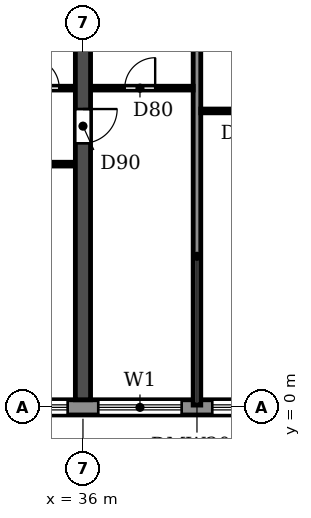
"""IFC4 building model, lengths in metres.
Left out: names, types, materials, properties, quantities, classifications, styles, units other than length and angle.
Written with IfcOpenShell. Run it as: python <this file> out.ifc"""

import sys

from ifc_helpers import new_model, si_unit, direction, frame, frame_2d, origin, place, context, subcontext, project, spatial, rectangle, extrude, element, fill, save


model = new_model("IFC4")
c1 = context("Model", 3, precision=1e-05, world=origin(), true_north=direction((0.0, 1.0)))
c2 = subcontext(c1, "Body", "Model", "MODEL_VIEW")
j1 = project(units=[si_unit("LENGTHUNIT", "METRE"), si_unit("PLANEANGLEUNIT", "RADIAN")], contexts=[c1])
p1 = place(None, origin())
s1 = spatial("IfcSite", under=j1, at=p1, CompositionType="ELEMENT")
p2 = place(p1, origin())
s2 = spatial("IfcBuilding", under=s1, at=p2, CompositionType="ELEMENT")
p3 = place(p2, frame((0.0, 0.0, 33.3)))
s3 = spatial("IfcBuildingStorey", under=s2, at=p3, CompositionType="ELEMENT", Elevation=33.3)
p4 = place(p3, frame((36.0, 0.2, 0.0), z_axis=(0.0, 0.0, 1.0), x_axis=(0.0, 1.0, 0.0)))
e1 = element("IfcWall", 1, at=p4, inside=s3, PredefinedType="SHEAR", context=c2, shape_type="SweptSolid", body=[
    extrude(rectangle(XDim=11.65, YDim=0.4, at=frame_2d((5.825, 0.0))), origin(), (0.0, 0.0, 1.0), 3.05),
])
p5 = place(p4, frame((6.75, 0.0, 0.0)))
e2 = element("IfcOpeningElement", 2, at=p5, cuts=e1, PredefinedType="OPENING", context=c2, shape_type="SweptSolid", body=[
    extrude(rectangle(XDim=0.9, YDim=2.1, at=frame_2d((0.45, 1.05))), frame((0.0, 0.21, 0.0), z_axis=(0.0, -1.0, 0.0), x_axis=(1.0, 0.0, 0.0)), (0.0, 0.0, 1.0), 0.42),
])
p6 = place(p3, frame((4.683, 0.0, 0.0), z_axis=(0.0, 0.0, 1.0), x_axis=(1.0, 0.0, 0.0)))
e3 = element("IfcWall", 3, at=p6, inside=s3, PredefinedType="STANDARD", context=c2, shape_type="SweptSolid", body=[
    extrude(rectangle(XDim=92.634, YDim=0.4, at=frame_2d((46.317, 0.0))), origin(), (0.0, 0.0, 1.0), 3.05),
])
p7 = place(p6, frame((1.717, 0.0, 0.9)))
e4 = element("IfcOpeningElement", 4, at=p7, cuts=e3, PredefinedType="OPENING", context=c2, shape_type="SweptSolid", body=[
    extrude(rectangle(XDim=2.2, YDim=1.5, at=frame_2d((1.1, 0.75))), frame((0.0, 0.21, 0.0), z_axis=(0.0, -1.0, 0.0), x_axis=(1.0, 0.0, 0.0)), (0.0, 0.0, 1.0), 0.42),
])
p8 = place(p6, frame((4.717, 0.0, 0.9)))
e5 = element("IfcOpeningElement", 5, at=p8, cuts=e3, PredefinedType="OPENING", context=c2, shape_type="SweptSolid", body=[
    extrude(rectangle(XDim=2.2, YDim=1.5, at=frame_2d((1.1, 0.75))), frame((0.0, 0.21, 0.0), z_axis=(0.0, -1.0, 0.0), x_axis=(1.0, 0.0, 0.0)), (0.0, 0.0, 1.0), 0.42),
])
p9 = place(p6, frame((7.917, 0.0, 0.0)))
e6 = element("IfcOpeningElement", 6, at=p9, cuts=e3, PredefinedType="OPENING", context=c2, shape_type="SweptSolid", body=[
    extrude(rectangle(XDim=1.8, YDim=2.4, at=frame_2d((0.9, 1.2))), frame((0.0, 0.21, 0.0), z_axis=(0.0, -1.0, 0.0), x_axis=(1.0, 0.0, 0.0)), (0.0, 0.0, 1.0), 0.42),
])
p10 = place(p6, frame((10.717, 0.0, 0.9)))
e7 = element("IfcOpeningElement", 7, at=p10, cuts=e3, PredefinedType="OPENING", context=c2, shape_type="SweptSolid", body=[
    extrude(rectangle(XDim=2.2, YDim=1.5, at=frame_2d((1.1, 0.75))), frame((0.0, 0.21, 0.0), z_axis=(0.0, -1.0, 0.0), x_axis=(1.0, 0.0, 0.0)), (0.0, 0.0, 1.0), 0.42),
])
p11 = place(p6, frame((13.717, 0.0, 0.9)))
e8 = element("IfcOpeningElement", 8, at=p11, cuts=e3, PredefinedType="OPENING", context=c2, shape_type="SweptSolid", body=[
    extrude(rectangle(XDim=2.2, YDim=1.5, at=frame_2d((1.1, 0.75))), frame((0.0, 0.21, 0.0), z_axis=(0.0, -1.0, 0.0), x_axis=(1.0, 0.0, 0.0)), (0.0, 0.0, 1.0), 0.42),
])
p12 = place(p6, frame((16.717, 0.0, 0.9)))
e9 = element("IfcOpeningElement", 9, at=p12, cuts=e3, PredefinedType="OPENING", context=c2, shape_type="SweptSolid", body=[
    extrude(rectangle(XDim=2.2, YDim=1.5, at=frame_2d((1.1, 0.75))), frame((0.0, 0.21, 0.0), z_axis=(0.0, -1.0, 0.0), x_axis=(1.0, 0.0, 0.0)), (0.0, 0.0, 1.0), 0.42),
])
p13 = place(p6, frame((19.717, 0.0, 0.9)))
e10 = element("IfcOpeningElement", 10, at=p13, cuts=e3, PredefinedType="OPENING", context=c2, shape_type="SweptSolid", body=[
    extrude(rectangle(XDim=2.2, YDim=1.5, at=frame_2d((1.1, 0.75))), frame((0.0, 0.21, 0.0), z_axis=(0.0, -1.0, 0.0), x_axis=(1.0, 0.0, 0.0)), (0.0, 0.0, 1.0), 0.42),
])
p14 = place(p6, frame((22.917, 0.0, 0.0)))
e11 = element("IfcOpeningElement", 11, at=p14, cuts=e3, PredefinedType="OPENING", context=c2, shape_type="SweptSolid", body=[
    extrude(rectangle(XDim=1.8, YDim=2.4, at=frame_2d((0.9, 1.2))), frame((0.0, 0.21, 0.0), z_axis=(0.0, -1.0, 0.0), x_axis=(1.0, 0.0, 0.0)), (0.0, 0.0, 1.0), 0.42),
])
p15 = place(p6, frame((25.717, 0.0, 0.9)))
e12 = element("IfcOpeningElement", 12, at=p15, cuts=e3, PredefinedType="OPENING", context=c2, shape_type="SweptSolid", body=[
    extrude(rectangle(XDim=2.2, YDim=1.5, at=frame_2d((1.1, 0.75))), frame((0.0, 0.21, 0.0), z_axis=(0.0, -1.0, 0.0), x_axis=(1.0, 0.0, 0.0)), (0.0, 0.0, 1.0), 0.42),
])
p16 = place(p6, frame((28.717, 0.0, 0.9)))
e13 = element("IfcOpeningElement", 13, at=p16, cuts=e3, PredefinedType="OPENING", context=c2, shape_type="SweptSolid", body=[
    extrude(rectangle(XDim=2.2, YDim=1.5, at=frame_2d((1.1, 0.75))), frame((0.0, 0.21, 0.0), z_axis=(0.0, -1.0, 0.0), x_axis=(1.0, 0.0, 0.0)), (0.0, 0.0, 1.0), 0.42),
])
p17 = place(p6, frame((31.717, 0.0, 0.9)))
e14 = element("IfcOpeningElement", 14, at=p17, cuts=e3, PredefinedType="OPENING", context=c2, shape_type="SweptSolid", body=[
    extrude(rectangle(XDim=2.2, YDim=1.5, at=frame_2d((1.1, 0.75))), frame((0.0, 0.21, 0.0), z_axis=(0.0, -1.0, 0.0), x_axis=(1.0, 0.0, 0.0)), (0.0, 0.0, 1.0), 0.42),
])
p18 = place(p6, frame((34.717, 0.0, 0.9)))
e15 = element("IfcOpeningElement", 15, at=p18, cuts=e3, PredefinedType="OPENING", context=c2, shape_type="SweptSolid", body=[
    extrude(rectangle(XDim=2.2, YDim=1.5, at=frame_2d((1.1, 0.75))), frame((0.0, 0.21, 0.0), z_axis=(0.0, -1.0, 0.0), x_axis=(1.0, 0.0, 0.0)), (0.0, 0.0, 1.0), 0.42),
])
p19 = place(p6, frame((37.717, 0.0, 0.9)))
e16 = element("IfcOpeningElement", 16, at=p19, cuts=e3, PredefinedType="OPENING", context=c2, shape_type="SweptSolid", body=[
    extrude(rectangle(XDim=2.2, YDim=1.5, at=frame_2d((1.1, 0.75))), frame((0.0, 0.21, 0.0), z_axis=(0.0, -1.0, 0.0), x_axis=(1.0, 0.0, 0.0)), (0.0, 0.0, 1.0), 0.42),
])
p20 = place(p6, frame((40.717, 0.0, 0.9)))
e17 = element("IfcOpeningElement", 17, at=p20, cuts=e3, PredefinedType="OPENING", context=c2, shape_type="SweptSolid", body=[
    extrude(rectangle(XDim=2.2, YDim=1.5, at=frame_2d((1.1, 0.75))), frame((0.0, 0.21, 0.0), z_axis=(0.0, -1.0, 0.0), x_axis=(1.0, 0.0, 0.0)), (0.0, 0.0, 1.0), 0.42),
])
p21 = place(p6, frame((43.717, 0.0, 0.9)))
e18 = element("IfcOpeningElement", 18, at=p21, cuts=e3, PredefinedType="OPENING", context=c2, shape_type="SweptSolid", body=[
    extrude(rectangle(XDim=2.2, YDim=1.5, at=frame_2d((1.1, 0.75))), frame((0.0, 0.21, 0.0), z_axis=(0.0, -1.0, 0.0), x_axis=(1.0, 0.0, 0.0)), (0.0, 0.0, 1.0), 0.42),
])
p22 = place(p6, frame((46.917, 0.0, 0.0)))
e19 = element("IfcOpeningElement", 19, at=p22, cuts=e3, PredefinedType="OPENING", context=c2, shape_type="SweptSolid", body=[
    extrude(rectangle(XDim=1.8, YDim=2.4, at=frame_2d((0.9, 1.2))), frame((0.0, 0.21, 0.0), z_axis=(0.0, -1.0, 0.0), x_axis=(1.0, 0.0, 0.0)), (0.0, 0.0, 1.0), 0.42),
])
p23 = place(p6, frame((49.717, 0.0, 0.9)))
e20 = element("IfcOpeningElement", 20, at=p23, cuts=e3, PredefinedType="OPENING", context=c2, shape_type="SweptSolid", body=[
    extrude(rectangle(XDim=2.2, YDim=1.5, at=frame_2d((1.1, 0.75))), frame((0.0, 0.21, 0.0), z_axis=(0.0, -1.0, 0.0), x_axis=(1.0, 0.0, 0.0)), (0.0, 0.0, 1.0), 0.42),
])
p24 = place(p6, frame((52.717, 0.0, 0.9)))
e21 = element("IfcOpeningElement", 21, at=p24, cuts=e3, PredefinedType="OPENING", context=c2, shape_type="SweptSolid", body=[
    extrude(rectangle(XDim=2.2, YDim=1.5, at=frame_2d((1.1, 0.75))), frame((0.0, 0.21, 0.0), z_axis=(0.0, -1.0, 0.0), x_axis=(1.0, 0.0, 0.0)), (0.0, 0.0, 1.0), 0.42),
])
p25 = place(p6, frame((55.717, 0.0, 0.9)))
e22 = element("IfcOpeningElement", 22, at=p25, cuts=e3, PredefinedType="OPENING", context=c2, shape_type="SweptSolid", body=[
    extrude(rectangle(XDim=2.2, YDim=1.5, at=frame_2d((1.1, 0.75))), frame((0.0, 0.21, 0.0), z_axis=(0.0, -1.0, 0.0), x_axis=(1.0, 0.0, 0.0)), (0.0, 0.0, 1.0), 0.42),
])
p26 = place(p6, frame((58.917, 0.0, 0.0)))
e23 = element("IfcOpeningElement", 23, at=p26, cuts=e3, PredefinedType="OPENING", context=c2, shape_type="SweptSolid", body=[
    extrude(rectangle(XDim=1.8, YDim=2.4, at=frame_2d((0.9, 1.2))), frame((0.0, 0.21, 0.0), z_axis=(0.0, -1.0, 0.0), x_axis=(1.0, 0.0, 0.0)), (0.0, 0.0, 1.0), 0.42),
])
p27 = place(p6, frame((61.717, 0.0, 0.9)))
e24 = element("IfcOpeningElement", 24, at=p27, cuts=e3, PredefinedType="OPENING", context=c2, shape_type="SweptSolid", body=[
    extrude(rectangle(XDim=2.2, YDim=1.5, at=frame_2d((1.1, 0.75))), frame((0.0, 0.21, 0.0), z_axis=(0.0, -1.0, 0.0), x_axis=(1.0, 0.0, 0.0)), (0.0, 0.0, 1.0), 0.42),
])
p28 = place(p6, frame((64.717, 0.0, 0.9)))
e25 = element("IfcOpeningElement", 25, at=p28, cuts=e3, PredefinedType="OPENING", context=c2, shape_type="SweptSolid", body=[
    extrude(rectangle(XDim=2.2, YDim=1.5, at=frame_2d((1.1, 0.75))), frame((0.0, 0.21, 0.0), z_axis=(0.0, -1.0, 0.0), x_axis=(1.0, 0.0, 0.0)), (0.0, 0.0, 1.0), 0.42),
])
p29 = place(p6, frame((67.717, 0.0, 0.9)))
e26 = element("IfcOpeningElement", 26, at=p29, cuts=e3, PredefinedType="OPENING", context=c2, shape_type="SweptSolid", body=[
    extrude(rectangle(XDim=2.2, YDim=1.5, at=frame_2d((1.1, 0.75))), frame((0.0, 0.21, 0.0), z_axis=(0.0, -1.0, 0.0), x_axis=(1.0, 0.0, 0.0)), (0.0, 0.0, 1.0), 0.42),
])
p30 = place(p6, frame((70.917, 0.0, 0.0)))
e27 = element("IfcOpeningElement", 27, at=p30, cuts=e3, PredefinedType="OPENING", context=c2, shape_type="SweptSolid", body=[
    extrude(rectangle(XDim=1.8, YDim=2.4, at=frame_2d((0.9, 1.2))), frame((0.0, 0.21, 0.0), z_axis=(0.0, -1.0, 0.0), x_axis=(1.0, 0.0, 0.0)), (0.0, 0.0, 1.0), 0.42),
])
p31 = place(p6, frame((73.717, 0.0, 0.9)))
e28 = element("IfcOpeningElement", 28, at=p31, cuts=e3, PredefinedType="OPENING", context=c2, shape_type="SweptSolid", body=[
    extrude(rectangle(XDim=2.2, YDim=1.5, at=frame_2d((1.1, 0.75))), frame((0.0, 0.21, 0.0), z_axis=(0.0, -1.0, 0.0), x_axis=(1.0, 0.0, 0.0)), (0.0, 0.0, 1.0), 0.42),
])
p32 = place(p6, frame((76.717, 0.0, 0.9)))
e29 = element("IfcOpeningElement", 29, at=p32, cuts=e3, PredefinedType="OPENING", context=c2, shape_type="SweptSolid", body=[
    extrude(rectangle(XDim=2.2, YDim=1.5, at=frame_2d((1.1, 0.75))), frame((0.0, 0.21, 0.0), z_axis=(0.0, -1.0, 0.0), x_axis=(1.0, 0.0, 0.0)), (0.0, 0.0, 1.0), 0.42),
])
p33 = place(p6, frame((79.717, 0.0, 0.9)))
e30 = element("IfcOpeningElement", 30, at=p33, cuts=e3, PredefinedType="OPENING", context=c2, shape_type="SweptSolid", body=[
    extrude(rectangle(XDim=2.2, YDim=1.5, at=frame_2d((1.1, 0.75))), frame((0.0, 0.21, 0.0), z_axis=(0.0, -1.0, 0.0), x_axis=(1.0, 0.0, 0.0)), (0.0, 0.0, 1.0), 0.42),
])
p34 = place(p6, frame((82.717, 0.0, 0.9)))
e31 = element("IfcOpeningElement", 31, at=p34, cuts=e3, PredefinedType="OPENING", context=c2, shape_type="SweptSolid", body=[
    extrude(rectangle(XDim=2.2, YDim=1.5, at=frame_2d((1.1, 0.75))), frame((0.0, 0.21, 0.0), z_axis=(0.0, -1.0, 0.0), x_axis=(1.0, 0.0, 0.0)), (0.0, 0.0, 1.0), 0.42),
])
p35 = place(p6, frame((85.717, 0.0, 0.9)))
e32 = element("IfcOpeningElement", 32, at=p35, cuts=e3, PredefinedType="OPENING", context=c2, shape_type="SweptSolid", body=[
    extrude(rectangle(XDim=2.2, YDim=1.5, at=frame_2d((1.1, 0.75))), frame((0.0, 0.21, 0.0), z_axis=(0.0, -1.0, 0.0), x_axis=(1.0, 0.0, 0.0)), (0.0, 0.0, 1.0), 0.42),
])
p36 = place(p6, frame((88.717, 0.0, 0.9)))
e33 = element("IfcOpeningElement", 33, at=p36, cuts=e3, PredefinedType="OPENING", context=c2, shape_type="SweptSolid", body=[
    extrude(rectangle(XDim=2.2, YDim=1.5, at=frame_2d((1.1, 0.75))), frame((0.0, 0.21, 0.0), z_axis=(0.0, -1.0, 0.0), x_axis=(1.0, 0.0, 0.0)), (0.0, 0.0, 1.0), 0.42),
])
p37 = place(p3, frame((39.0, 0.06, 0.0), z_axis=(0.0, 0.0, 1.0), x_axis=(0.0, 1.0, 0.0)))
e34 = element("IfcWall", 34, at=p37, inside=s3, PredefinedType="PARTITIONING", context=c2, shape_type="SweptSolid", body=[
    extrude(rectangle(XDim=11.78, YDim=0.2, at=frame_2d((5.89, 0.0))), origin(), (0.0, 0.0, 1.0), 3.05),
])
p38 = place(p3, frame((32.95, 6.4, 0.0), z_axis=(0.0, 0.0, 1.0), x_axis=(1.0, 0.0, 0.0)))
e35 = element("IfcWall", 35, at=p38, inside=s3, PredefinedType="PARTITIONING", context=c2, shape_type="SweptSolid", body=[
    extrude(rectangle(XDim=2.84, YDim=0.1, at=frame_2d((1.42, 0.0))), origin(), (0.0, 0.0, 1.0), 3.05),
])
p39 = place(p38, frame((0.55, 0.0, 0.0)))
e36 = element("IfcOpeningElement", 36, at=p39, cuts=e35, PredefinedType="OPENING", context=c2, shape_type="SweptSolid", body=[
    extrude(rectangle(XDim=0.9, YDim=2.1, at=frame_2d((0.45, 1.05))), frame((0.0, 0.06, 0.0), z_axis=(0.0, -1.0, 0.0), x_axis=(1.0, 0.0, 0.0)), (0.0, 0.0, 1.0), 0.12),
])
p40 = place(p3, frame((39.1, 7.8, 0.0), z_axis=(0.0, 0.0, 1.0), x_axis=(1.0, 0.0, 0.0)))
e37 = element("IfcWall", 37, at=p40, inside=s3, PredefinedType="PARTITIONING", context=c2, shape_type="SweptSolid", body=[
    extrude(rectangle(XDim=2.69, YDim=0.1, at=frame_2d((1.345, 0.0))), origin(), (0.0, 0.0, 1.0), 3.05),
])
p41 = place(p40, frame((1.0, 0.0, 0.0)))
e38 = element("IfcOpeningElement", 38, at=p41, cuts=e37, PredefinedType="OPENING", context=c2, shape_type="SweptSolid", body=[
    extrude(rectangle(XDim=0.8, YDim=2.1, at=frame_2d((0.4, 1.05))), frame((0.0, 0.06, 0.0), z_axis=(0.0, -1.0, 0.0), x_axis=(1.0, 0.0, 0.0)), (0.0, 0.0, 1.0), 0.12),
])
p42 = place(p3, frame((33.9, 8.4, 0.0), z_axis=(0.0, 0.0, 1.0), x_axis=(1.0, 0.0, 0.0)))
e39 = element("IfcWall", 39, at=p42, inside=s3, PredefinedType="PARTITIONING", context=c2, shape_type="SweptSolid", body=[
    extrude(rectangle(XDim=1.89, YDim=0.1, at=frame_2d((0.945, 0.0))), origin(), (0.0, 0.0, 1.0), 3.05),
])
p43 = place(p42, frame((0.675, 0.0, 0.0)))
e40 = element("IfcOpeningElement", 40, at=p43, cuts=e39, PredefinedType="OPENING", context=c2, shape_type="SweptSolid", body=[
    extrude(rectangle(XDim=0.8, YDim=2.1, at=frame_2d((0.4, 1.05))), frame((0.0, 0.06, 0.0), z_axis=(0.0, -1.0, 0.0), x_axis=(1.0, 0.0, 0.0)), (0.0, 0.0, 1.0), 0.12),
])
p44 = place(p3, frame((36.21, 8.4, 0.0), z_axis=(0.0, 0.0, 1.0), x_axis=(1.0, 0.0, 0.0)))
e41 = element("IfcWall", 41, at=p44, inside=s3, PredefinedType="PARTITIONING", context=c2, shape_type="SweptSolid", body=[
    extrude(rectangle(XDim=2.69, YDim=0.1, at=frame_2d((1.345, 0.0))), origin(), (0.0, 0.0, 1.0), 3.05),
])
p45 = place(p44, frame((0.89, 0.0, 0.0)))
e42 = element("IfcOpeningElement", 42, at=p45, cuts=e41, PredefinedType="OPENING", context=c2, shape_type="SweptSolid", body=[
    extrude(rectangle(XDim=0.8, YDim=2.1, at=frame_2d((0.4, 1.05))), frame((0.0, 0.06, 0.0), z_axis=(0.0, -1.0, 0.0), x_axis=(1.0, 0.0, 0.0)), (0.0, 0.0, 1.0), 0.12),
])
p46 = place(p16, origin())
e43 = element("IfcWindow", 43, at=p46, inside=s3, PartitioningType="DOUBLE_PANEL_HORIZONTAL", PredefinedType="WINDOW", context=c2, shape_type="SweptSolid", body=[
    extrude(rectangle(XDim=2.2, YDim=1.5, at=frame_2d((1.1, 0.75))), frame((0.0, 0.03, 0.0), z_axis=(0.0, -1.0, 0.0), x_axis=(1.0, 0.0, 0.0)), (0.0, 0.0, 1.0), 0.06),
])
fill(e13, e43)
p47 = place(p17, origin())
e44 = element("IfcWindow", 44, at=p47, inside=s3, PartitioningType="DOUBLE_PANEL_HORIZONTAL", PredefinedType="WINDOW", context=c2, shape_type="SweptSolid", body=[
    extrude(rectangle(XDim=2.2, YDim=1.5, at=frame_2d((1.1, 0.75))), frame((0.0, 0.03, 0.0), z_axis=(0.0, -1.0, 0.0), x_axis=(1.0, 0.0, 0.0)), (0.0, 0.0, 1.0), 0.06),
])
fill(e14, e44)
p48 = place(p18, origin())
e45 = element("IfcWindow", 45, at=p48, inside=s3, PartitioningType="DOUBLE_PANEL_HORIZONTAL", PredefinedType="WINDOW", context=c2, shape_type="SweptSolid", body=[
    extrude(rectangle(XDim=2.2, YDim=1.5, at=frame_2d((1.1, 0.75))), frame((0.0, 0.03, 0.0), z_axis=(0.0, -1.0, 0.0), x_axis=(1.0, 0.0, 0.0)), (0.0, 0.0, 1.0), 0.06),
])
fill(e15, e45)
p49 = place(p45, origin())
e46 = element("IfcDoor", 46, at=p49, inside=s3, OperationType="SINGLE_SWING_RIGHT", PredefinedType="DOOR", context=c2, shape_type="SweptSolid", body=[
    extrude(rectangle(XDim=0.8, YDim=2.1, at=frame_2d((0.4, 1.05))), frame((0.0, 0.025, 0.0), z_axis=(0.0, -1.0, 0.0), x_axis=(1.0, 0.0, 0.0)), (0.0, 0.0, 1.0), 0.05),
])
fill(e42, e46)
p50 = place(p43, origin())
e47 = element("IfcDoor", 47, at=p50, inside=s3, OperationType="SINGLE_SWING_LEFT", PredefinedType="DOOR", context=c2, shape_type="SweptSolid", body=[
    extrude(rectangle(XDim=0.8, YDim=2.1, at=frame_2d((0.4, 1.05))), frame((0.0, 0.025, 0.0), z_axis=(0.0, -1.0, 0.0), x_axis=(1.0, 0.0, 0.0)), (0.0, 0.0, 1.0), 0.05),
])
fill(e40, e47)
p51 = place(p5, frame((0.9, 0.0, 0.0), z_axis=(0.0, 0.0, 1.0), x_axis=(-1.0, 0.0, 0.0)))
e48 = element("IfcDoor", 48, at=p51, inside=s3, OperationType="SINGLE_SWING_LEFT", PredefinedType="DOOR", context=c2, shape_type="SweptSolid", body=[
    extrude(rectangle(XDim=0.9, YDim=2.1, at=frame_2d((0.45, 1.05))), frame((0.0, 0.025, 0.0), z_axis=(0.0, -1.0, 0.0), x_axis=(1.0, 0.0, 0.0)), (0.0, 0.0, 1.0), 0.05),
])
fill(e2, e48)
save(model, sys.argv[1])
